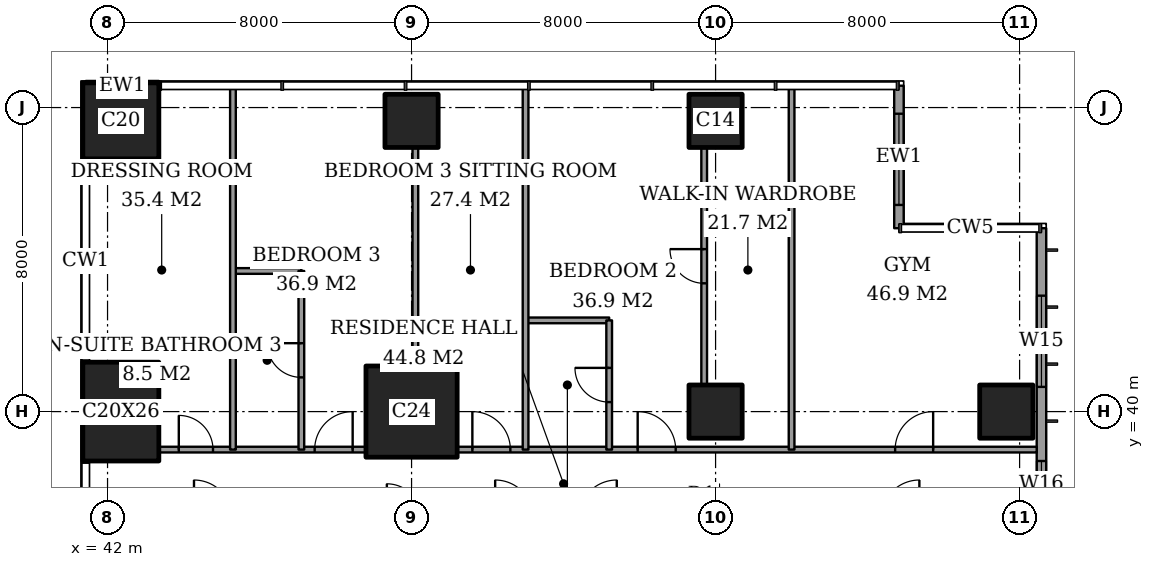
"""IFC4 building model, lengths in metres.
Left out: names, types, materials, properties, quantities, classifications, styles, units other than length and angle.
Written with IfcOpenShell. Run it as: python <this file> out.ifc"""

import sys

from ifc_helpers import new_model, si_unit, direction, frame, frame_2d, origin, origin_2d, place, context, subcontext, project, spatial, rectangle, extrude, element, fill, save


model = new_model("IFC4")
c1 = context("Model", 3, precision=1e-05, world=origin(), true_north=direction((0.0, 1.0)))
c2 = subcontext(c1, "Body", "Model", "MODEL_VIEW")
j1 = project(units=[si_unit("LENGTHUNIT", "METRE"), si_unit("PLANEANGLEUNIT", "RADIAN")], contexts=[c1])
p1 = place(None, origin())
s1 = spatial("IfcSite", under=j1, at=p1, CompositionType="ELEMENT")
p2 = place(p1, origin())
s2 = spatial("IfcBuilding", under=s1, at=p2, CompositionType="ELEMENT")
p3 = place(p2, frame((0.0, 0.0, 282.6)))
s3 = spatial("IfcBuildingStorey", under=s2, at=p3, CompositionType="ELEMENT", Elevation=282.6)
p4 = place(p3, frame((42.35, 40.0, 0.0), z_axis=(0.0, 0.0, 1.0), x_axis=(1.0, 0.0, 0.0)))
e1 = element("IfcColumn", 1, at=p4, inside=s3, PredefinedType="COLUMN", context=c2, shape_type="SweptSolid", body=[
    extrude(rectangle(XDim=2.0, YDim=2.6, at=origin_2d()), origin(), (0.0, 0.0, 1.0), 4.5),
])
p5 = place(p3, frame((42.35, 47.65, 0.0), z_axis=(0.0, 0.0, 1.0), x_axis=(1.0, 0.0, 0.0)))
e2 = element("IfcColumn", 2, at=p5, inside=s3, PredefinedType="COLUMN", context=c2, shape_type="SweptSolid", body=[
    extrude(rectangle(XDim=2.0, YDim=2.0, at=origin_2d()), origin(), (0.0, 0.0, 1.0), 4.5),
])
p6 = place(p3, frame((50.0, 40.0, 0.0), z_axis=(0.0, 0.0, 1.0), x_axis=(1.0, 0.0, 0.0)))
e3 = element("IfcColumn", 3, at=p6, inside=s3, PredefinedType="COLUMN", context=c2, shape_type="SweptSolid", body=[
    extrude(rectangle(XDim=2.4, YDim=2.4, at=origin_2d()), origin(), (0.0, 0.0, 1.0), 4.5),
])
for number, where, z_axis, x_axis in (
    (4, (50.0, 47.65, 0.0), (0.0, 0.0, 1.0), (1.0, 0.0, 0.0)),
    (5, (58.0, 40.0, 0.0), (0.0, 0.0, 1.0), (1.0, 0.0, 0.0)),
    (6, (58.0, 47.65, 0.0), (0.0, 0.0, 1.0), (1.0, 0.0, 0.0)),
    (7, (65.65, 40.0, 0.0), (0.0, 0.0, 1.0), (1.0, 0.0, 0.0)),
):
    element("IfcColumn", number, at=place(p3, frame(where, z_axis=z_axis, x_axis=x_axis)), inside=s3, PredefinedType="COLUMN", context=c2, shape_type="SweptSolid", body=[
        extrude(rectangle(XDim=1.4, YDim=1.4, at=origin_2d()), origin(), (0.0, 0.0, 1.0), 4.5),
    ])
p7 = place(p3, frame((66.575, 3.175, 0.0), z_axis=(0.0, 0.0, 1.0), x_axis=(0.0, 1.0, 0.0)))
e8 = element("IfcWall", 8, at=p7, inside=s3, PredefinedType="SOLIDWALL", context=c2, shape_type="SweptSolid", body=[
    extrude(rectangle(XDim=41.65, YDim=0.25, at=frame_2d((20.825, 0.0))), origin(), (0.0, 0.0, 1.0), 4.5),
])
p8 = place(p7, frame((1.775, 0.0, 0.6)))
e9 = element("IfcOpeningElement", 9, at=p8, cuts=e8, PredefinedType="OPENING", context=c2, shape_type="SweptSolid", body=[
    extrude(rectangle(XDim=2.4, YDim=2.8, at=frame_2d((1.2, 1.4))), frame((0.0, 0.135, 0.0), z_axis=(0.0, -1.0, 0.0), x_axis=(1.0, 0.0, 0.0)), (0.0, 0.0, 1.0), 0.27),
])
p9 = place(p7, frame((6.225, 0.0, 0.6)))
e10 = element("IfcOpeningElement", 10, at=p9, cuts=e8, PredefinedType="OPENING", context=c2, shape_type="SweptSolid", body=[
    extrude(rectangle(XDim=1.2, YDim=2.8, at=frame_2d((0.6, 1.4))), frame((0.0, 0.135, 0.0), z_axis=(0.0, -1.0, 0.0), x_axis=(1.0, 0.0, 0.0)), (0.0, 0.0, 1.0), 0.27),
])
p10 = place(p7, frame((9.625, 0.0, 0.6)))
e11 = element("IfcOpeningElement", 11, at=p10, cuts=e8, PredefinedType="OPENING", context=c2, shape_type="SweptSolid", body=[
    extrude(rectangle(XDim=2.4, YDim=2.8, at=frame_2d((1.2, 1.4))), frame((0.0, 0.135, 0.0), z_axis=(0.0, -1.0, 0.0), x_axis=(1.0, 0.0, 0.0)), (0.0, 0.0, 1.0), 0.27),
])
p11 = place(p7, frame((14.525, 0.0, 0.6)))
e12 = element("IfcOpeningElement", 12, at=p11, cuts=e8, PredefinedType="OPENING", context=c2, shape_type="SweptSolid", body=[
    extrude(rectangle(XDim=2.4, YDim=2.8, at=frame_2d((1.2, 1.4))), frame((0.0, 0.135, 0.0), z_axis=(0.0, -1.0, 0.0), x_axis=(1.0, 0.0, 0.0)), (0.0, 0.0, 1.0), 0.27),
])
p12 = place(p7, frame((17.725, 0.0, 0.6)))
e13 = element("IfcOpeningElement", 13, at=p12, cuts=e8, PredefinedType="OPENING", context=c2, shape_type="SweptSolid", body=[
    extrude(rectangle(XDim=2.4, YDim=2.8, at=frame_2d((1.2, 1.4))), frame((0.0, 0.135, 0.0), z_axis=(0.0, -1.0, 0.0), x_axis=(1.0, 0.0, 0.0)), (0.0, 0.0, 1.0), 0.27),
])
p13 = place(p7, frame((21.525, 0.0, 0.6)))
e14 = element("IfcOpeningElement", 14, at=p13, cuts=e8, PredefinedType="OPENING", context=c2, shape_type="SweptSolid", body=[
    extrude(rectangle(XDim=2.4, YDim=2.8, at=frame_2d((1.2, 1.4))), frame((0.0, 0.135, 0.0), z_axis=(0.0, -1.0, 0.0), x_axis=(1.0, 0.0, 0.0)), (0.0, 0.0, 1.0), 0.27),
])
p14 = place(p7, frame((24.725, 0.0, 0.6)))
e15 = element("IfcOpeningElement", 15, at=p14, cuts=e8, PredefinedType="OPENING", context=c2, shape_type="SweptSolid", body=[
    extrude(rectangle(XDim=2.4, YDim=2.8, at=frame_2d((1.2, 1.4))), frame((0.0, 0.135, 0.0), z_axis=(0.0, -1.0, 0.0), x_axis=(1.0, 0.0, 0.0)), (0.0, 0.0, 1.0), 0.27),
])
p15 = place(p7, frame((29.725, 0.0, 0.6)))
e16 = element("IfcOpeningElement", 16, at=p15, cuts=e8, PredefinedType="OPENING", context=c2, shape_type="SweptSolid", body=[
    extrude(rectangle(XDim=2.4, YDim=2.8, at=frame_2d((1.2, 1.4))), frame((0.0, 0.135, 0.0), z_axis=(0.0, -1.0, 0.0), x_axis=(1.0, 0.0, 0.0)), (0.0, 0.0, 1.0), 0.27),
])
p16 = place(p7, frame((34.325, 0.0, 0.6)))
e17 = element("IfcOpeningElement", 17, at=p16, cuts=e8, PredefinedType="OPENING", context=c2, shape_type="SweptSolid", body=[
    extrude(rectangle(XDim=1.2, YDim=2.8, at=frame_2d((0.6, 1.4))), frame((0.0, 0.135, 0.0), z_axis=(0.0, -1.0, 0.0), x_axis=(1.0, 0.0, 0.0)), (0.0, 0.0, 1.0), 0.27),
])
p17 = place(p7, frame((37.475, 0.0, 0.6)))
e18 = element("IfcOpeningElement", 18, at=p17, cuts=e8, PredefinedType="OPENING", context=c2, shape_type="SweptSolid", body=[
    extrude(rectangle(XDim=2.4, YDim=2.8, at=frame_2d((1.2, 1.4))), frame((0.0, 0.135, 0.0), z_axis=(0.0, -1.0, 0.0), x_axis=(1.0, 0.0, 0.0)), (0.0, 0.0, 1.0), 0.27),
])
p18 = place(p3, frame((62.825, 44.825, 0.0), z_axis=(0.0, 0.0, 1.0), x_axis=(0.0, 1.0, 0.0)))
e19 = element("IfcWall", 19, at=p18, inside=s3, PredefinedType="SOLIDWALL", context=c2, shape_type="SweptSolid", body=[
    extrude(rectangle(XDim=3.75, YDim=0.25, at=frame_2d((1.875, 0.0))), origin(), (0.0, 0.0, 1.0), 4.5),
])
p19 = place(p18, frame((0.613, 0.0, 0.6)))
e20 = element("IfcOpeningElement", 20, at=p19, cuts=e19, PredefinedType="OPENING", context=c2, shape_type="SweptSolid", body=[
    extrude(rectangle(XDim=2.4, YDim=2.8, at=frame_2d((1.2, 1.4))), frame((0.0, 0.135, 0.0), z_axis=(0.0, -1.0, 0.0), x_axis=(1.0, 0.0, 0.0)), (0.0, 0.0, 1.0), 0.27),
])
p20 = place(p3, frame((43.35, 48.575, 0.0), z_axis=(0.0, 0.0, 1.0), x_axis=(-1.0, 0.0, 0.0)))
e21 = element("IfcWall", 21, at=p20, inside=s3, PredefinedType="SOLIDWALL", context=c2, shape_type="SweptSolid", body=[
    extrude(rectangle(XDim=1.925, YDim=0.25, at=frame_2d((0.962, 0.0))), origin(), (0.0, 0.0, 1.0), 4.5),
])
p21 = place(p3, frame((43.35, 39.0, 0.0), z_axis=(0.0, 0.0, 1.0), x_axis=(1.0, 0.0, 0.0)))
e22 = element("IfcWall", 22, at=p21, inside=s3, PredefinedType="PARTITIONING", context=c2, shape_type="SweptSolid", body=[
    extrude(rectangle(XDim=5.45, YDim=0.15, at=frame_2d((2.725, 0.0))), origin(), (0.0, 0.0, 1.0), 4.25),
])
p22 = place(p21, frame((4.1, 0.0, 0.0)))
e23 = element("IfcOpeningElement", 23, at=p22, cuts=e22, PredefinedType="OPENING", context=c2, shape_type="SweptSolid", body=[
    extrude(rectangle(XDim=1.0, YDim=2.1, at=frame_2d((0.5, 1.05))), frame((0.0, 0.085, 0.0), z_axis=(0.0, -1.0, 0.0), x_axis=(1.0, 0.0, 0.0)), (0.0, 0.0, 1.0), 0.17),
])
p23 = place(p21, frame((0.525, 0.0, 0.0)))
e24 = element("IfcOpeningElement", 24, at=p23, cuts=e22, PredefinedType="OPENING", context=c2, shape_type="SweptSolid", body=[
    extrude(rectangle(XDim=0.9, YDim=2.1, at=frame_2d((0.45, 1.05))), frame((0.0, 0.085, 0.0), z_axis=(0.0, -1.0, 0.0), x_axis=(1.0, 0.0, 0.0)), (0.0, 0.0, 1.0), 0.17),
])
p24 = place(p3, frame((51.2, 39.0, 0.0), z_axis=(0.0, 0.0, 1.0), x_axis=(1.0, 0.0, 0.0)))
e25 = element("IfcWall", 25, at=p24, inside=s3, PredefinedType="PARTITIONING", context=c2, shape_type="SweptSolid", body=[
    extrude(rectangle(XDim=15.25, YDim=0.15, at=frame_2d((7.625, 0.0))), origin(), (0.0, 0.0, 1.0), 4.25),
])
p25 = place(p24, frame((11.525, 0.0, 0.0)))
e26 = element("IfcOpeningElement", 26, at=p25, cuts=e25, PredefinedType="OPENING", context=c2, shape_type="SweptSolid", body=[
    extrude(rectangle(XDim=1.0, YDim=2.1, at=frame_2d((0.5, 1.05))), frame((0.0, 0.085, 0.0), z_axis=(0.0, -1.0, 0.0), x_axis=(1.0, 0.0, 0.0)), (0.0, 0.0, 1.0), 0.17),
])
p26 = place(p24, frame((4.75, 0.0, 0.0)))
e27 = element("IfcOpeningElement", 27, at=p26, cuts=e25, PredefinedType="OPENING", context=c2, shape_type="SweptSolid", body=[
    extrude(rectangle(XDim=1.0, YDim=2.1, at=frame_2d((0.5, 1.05))), frame((0.0, 0.085, 0.0), z_axis=(0.0, -1.0, 0.0), x_axis=(1.0, 0.0, 0.0)), (0.0, 0.0, 1.0), 0.17),
])
p27 = place(p24, frame((0.4, 0.0, 0.0)))
e28 = element("IfcOpeningElement", 28, at=p27, cuts=e25, PredefinedType="OPENING", context=c2, shape_type="SweptSolid", body=[
    extrude(rectangle(XDim=1.0, YDim=2.1, at=frame_2d((0.5, 1.05))), frame((0.0, 0.085, 0.0), z_axis=(0.0, -1.0, 0.0), x_axis=(1.0, 0.0, 0.0)), (0.0, 0.0, 1.0), 0.17),
])
p28 = place(p3, frame((53.0, 42.4, 0.0), z_axis=(0.0, 0.0, 1.0), x_axis=(1.0, 0.0, 0.0)))
e29 = element("IfcWall", 29, at=p28, inside=s3, PredefinedType="PARTITIONING", context=c2, shape_type="SweptSolid", body=[
    extrude(rectangle(XDim=2.2, YDim=0.15, at=frame_2d((1.1, 0.0))), origin(), (0.0, 0.0, 1.0), 4.25),
])
p29 = place(p3, frame((45.3, 43.7, 0.0), z_axis=(0.0, 0.0, 1.0), x_axis=(1.0, 0.0, 0.0)))
e30 = element("IfcWall", 30, at=p29, inside=s3, PredefinedType="PARTITIONING", context=c2, shape_type="SweptSolid", body=[
    extrude(rectangle(XDim=1.8, YDim=0.15, at=frame_2d((0.9, 0.0))), origin(), (0.0, 0.0, 1.0), 4.25),
])
p30 = place(p3, frame((45.3, 39.0, 0.0), z_axis=(0.0, 0.0, 1.0), x_axis=(0.0, 1.0, 0.0)))
e31 = element("IfcWall", 31, at=p30, inside=s3, PredefinedType="PARTITIONING", context=c2, shape_type="SweptSolid", body=[
    extrude(rectangle(XDim=9.561, YDim=0.15, at=frame_2d((4.781, 0.0))), origin(), (0.0, 0.0, 1.0), 4.25),
])
p31 = place(p3, frame((47.1, 39.0, 0.0), z_axis=(0.0, 0.0, 1.0), x_axis=(0.0, 1.0, 0.0)))
e32 = element("IfcWall", 32, at=p31, inside=s3, PredefinedType="PARTITIONING", context=c2, shape_type="SweptSolid", body=[
    extrude(rectangle(XDim=4.7, YDim=0.15, at=frame_2d((2.35, 0.0))), origin(), (0.0, 0.0, 1.0), 4.25),
])
p32 = place(p31, frame((1.9, 0.0, 0.0)))
e33 = element("IfcOpeningElement", 33, at=p32, cuts=e32, PredefinedType="OPENING", context=c2, shape_type="SweptSolid", body=[
    extrude(rectangle(XDim=0.9, YDim=2.1, at=frame_2d((0.45, 1.05))), frame((0.0, 0.085, 0.0), z_axis=(0.0, -1.0, 0.0), x_axis=(1.0, 0.0, 0.0)), (0.0, 0.0, 1.0), 0.17),
])
p33 = place(p3, frame((50.1, 41.2, 0.0), z_axis=(0.0, 0.0, 1.0), x_axis=(0.0, 1.0, 0.0)))
e34 = element("IfcWall", 34, at=p33, inside=s3, PredefinedType="PARTITIONING", context=c2, shape_type="SweptSolid", body=[
    extrude(rectangle(XDim=5.75, YDim=0.15, at=frame_2d((2.875, 0.0))), origin(), (0.0, 0.0, 1.0), 4.25),
])
p34 = place(p3, frame((53.0, 39.0, 0.0), z_axis=(0.0, 0.0, 1.0), x_axis=(0.0, 1.0, 0.0)))
e35 = element("IfcWall", 35, at=p34, inside=s3, PredefinedType="PARTITIONING", context=c2, shape_type="SweptSolid", body=[
    extrude(rectangle(XDim=9.561, YDim=0.15, at=frame_2d((4.781, 0.0))), origin(), (0.0, 0.0, 1.0), 4.25),
])
p35 = place(p3, frame((55.2, 39.0, 0.0), z_axis=(0.0, 0.0, 1.0), x_axis=(0.0, 1.0, 0.0)))
e36 = element("IfcWall", 36, at=p35, inside=s3, PredefinedType="PARTITIONING", context=c2, shape_type="SweptSolid", body=[
    extrude(rectangle(XDim=3.4, YDim=0.15, at=frame_2d((1.7, 0.0))), origin(), (0.0, 0.0, 1.0), 4.25),
])
p36 = place(p35, frame((1.25, 0.0, 0.0)))
e37 = element("IfcOpeningElement", 37, at=p36, cuts=e36, PredefinedType="OPENING", context=c2, shape_type="SweptSolid", body=[
    extrude(rectangle(XDim=0.9, YDim=2.1, at=frame_2d((0.45, 1.05))), frame((0.0, 0.085, 0.0), z_axis=(0.0, -1.0, 0.0), x_axis=(1.0, 0.0, 0.0)), (0.0, 0.0, 1.0), 0.17),
])
p37 = place(p3, frame((57.7, 40.7, 0.0), z_axis=(0.0, 0.0, 1.0), x_axis=(0.0, 1.0, 0.0)))
e38 = element("IfcWall", 38, at=p37, inside=s3, PredefinedType="PARTITIONING", context=c2, shape_type="SweptSolid", body=[
    extrude(rectangle(XDim=6.25, YDim=0.15, at=frame_2d((3.125, 0.0))), origin(), (0.0, 0.0, 1.0), 4.25),
])
p38 = place(p37, frame((2.675, 0.0, 0.0)))
e39 = element("IfcOpeningElement", 39, at=p38, cuts=e38, PredefinedType="OPENING", context=c2, shape_type="SweptSolid", body=[
    extrude(rectangle(XDim=0.9, YDim=2.1, at=frame_2d((0.45, 1.05))), frame((0.0, 0.085, 0.0), z_axis=(0.0, -1.0, 0.0), x_axis=(1.0, 0.0, 0.0)), (0.0, 0.0, 1.0), 0.17),
])
p39 = place(p3, frame((60.0, 39.0, 0.0), z_axis=(0.0, 0.0, 1.0), x_axis=(0.0, 1.0, 0.0)))
e40 = element("IfcWall", 40, at=p39, inside=s3, PredefinedType="PARTITIONING", context=c2, shape_type="SweptSolid", body=[
    extrude(rectangle(XDim=9.561, YDim=0.15, at=frame_2d((4.781, 0.0))), origin(), (0.0, 0.0, 1.0), 4.25),
])
p40 = place(p16, origin())
e41 = element("IfcWindow", 41, at=p40, inside=s3, PartitioningType="SINGLE_PANEL", PredefinedType="WINDOW", context=c2, shape_type="SweptSolid", body=[
    extrude(rectangle(XDim=1.2, YDim=2.8, at=frame_2d((0.6, 1.4))), frame((0.0, 0.03, 0.0), z_axis=(0.0, -1.0, 0.0), x_axis=(1.0, 0.0, 0.0)), (0.0, 0.0, 1.0), 0.06),
])
fill(e17, e41)
p41 = place(p17, origin())
e42 = element("IfcWindow", 42, at=p41, inside=s3, PartitioningType="SINGLE_PANEL", PredefinedType="WINDOW", context=c2, shape_type="SweptSolid", body=[
    extrude(rectangle(XDim=2.4, YDim=2.8, at=frame_2d((1.2, 1.4))), frame((0.0, 0.03, 0.0), z_axis=(0.0, -1.0, 0.0), x_axis=(1.0, 0.0, 0.0)), (0.0, 0.0, 1.0), 0.06),
])
fill(e18, e42)
p42 = place(p19, origin())
e43 = element("IfcWindow", 43, at=p42, inside=s3, PartitioningType="SINGLE_PANEL", PredefinedType="WINDOW", context=c2, shape_type="SweptSolid", body=[
    extrude(rectangle(XDim=2.4, YDim=2.8, at=frame_2d((1.2, 1.4))), frame((0.0, 0.03, 0.0), z_axis=(0.0, -1.0, 0.0), x_axis=(1.0, 0.0, 0.0)), (0.0, 0.0, 1.0), 0.06),
])
fill(e20, e43)
p43 = place(p25, origin())
e44 = element("IfcDoor", 44, at=p43, inside=s3, OperationType="SINGLE_SWING_LEFT", PredefinedType="DOOR", context=c2, shape_type="SweptSolid", body=[
    extrude(rectangle(XDim=1.0, YDim=2.1, at=frame_2d((0.5, 1.05))), frame((0.0, 0.025, 0.0), z_axis=(0.0, -1.0, 0.0), x_axis=(1.0, 0.0, 0.0)), (0.0, 0.0, 1.0), 0.05),
])
fill(e26, e44)
p44 = place(p38, origin())
e45 = element("IfcDoor", 45, at=p44, inside=s3, OperationType="SINGLE_SWING_LEFT", PredefinedType="DOOR", context=c2, shape_type="SweptSolid", body=[
    extrude(rectangle(XDim=0.9, YDim=2.1, at=frame_2d((0.45, 1.05))), frame((0.0, 0.025, 0.0), z_axis=(0.0, -1.0, 0.0), x_axis=(1.0, 0.0, 0.0)), (0.0, 0.0, 1.0), 0.05),
])
fill(e39, e45)
p45 = place(p36, origin())
e46 = element("IfcDoor", 46, at=p45, inside=s3, OperationType="SINGLE_SWING_LEFT", PredefinedType="DOOR", context=c2, shape_type="SweptSolid", body=[
    extrude(rectangle(XDim=0.9, YDim=2.1, at=frame_2d((0.45, 1.05))), frame((0.0, 0.025, 0.0), z_axis=(0.0, -1.0, 0.0), x_axis=(1.0, 0.0, 0.0)), (0.0, 0.0, 1.0), 0.05),
])
fill(e37, e46)
p46 = place(p26, origin())
e47 = element("IfcDoor", 47, at=p46, inside=s3, OperationType="SINGLE_SWING_RIGHT", PredefinedType="DOOR", context=c2, shape_type="SweptSolid", body=[
    extrude(rectangle(XDim=1.0, YDim=2.1, at=frame_2d((0.5, 1.05))), frame((0.0, 0.025, 0.0), z_axis=(0.0, -1.0, 0.0), x_axis=(1.0, 0.0, 0.0)), (0.0, 0.0, 1.0), 0.05),
])
fill(e27, e47)
p47 = place(p27, origin())
e48 = element("IfcDoor", 48, at=p47, inside=s3, OperationType="SINGLE_SWING_RIGHT", PredefinedType="DOOR", context=c2, shape_type="SweptSolid", body=[
    extrude(rectangle(XDim=1.0, YDim=2.1, at=frame_2d((0.5, 1.05))), frame((0.0, 0.025, 0.0), z_axis=(0.0, -1.0, 0.0), x_axis=(1.0, 0.0, 0.0)), (0.0, 0.0, 1.0), 0.05),
])
fill(e28, e48)
p48 = place(p32, origin())
e49 = element("IfcDoor", 49, at=p48, inside=s3, OperationType="SINGLE_SWING_LEFT", PredefinedType="DOOR", context=c2, shape_type="SweptSolid", body=[
    extrude(rectangle(XDim=0.9, YDim=2.1, at=frame_2d((0.45, 1.05))), frame((0.0, 0.025, 0.0), z_axis=(0.0, -1.0, 0.0), x_axis=(1.0, 0.0, 0.0)), (0.0, 0.0, 1.0), 0.05),
])
fill(e33, e49)
p49 = place(p22, origin())
e50 = element("IfcDoor", 50, at=p49, inside=s3, OperationType="SINGLE_SWING_LEFT", PredefinedType="DOOR", context=c2, shape_type="SweptSolid", body=[
    extrude(rectangle(XDim=1.0, YDim=2.1, at=frame_2d((0.5, 1.05))), frame((0.0, 0.025, 0.0), z_axis=(0.0, -1.0, 0.0), x_axis=(1.0, 0.0, 0.0)), (0.0, 0.0, 1.0), 0.05),
])
fill(e23, e50)
p50 = place(p23, origin())
e51 = element("IfcDoor", 51, at=p50, inside=s3, OperationType="SINGLE_SWING_RIGHT", PredefinedType="DOOR", context=c2, shape_type="SweptSolid", body=[
    extrude(rectangle(XDim=0.9, YDim=2.1, at=frame_2d((0.45, 1.05))), frame((0.0, 0.025, 0.0), z_axis=(0.0, -1.0, 0.0), x_axis=(1.0, 0.0, 0.0)), (0.0, 0.0, 1.0), 0.05),
])
fill(e24, e51)
save(model, sys.argv[1])
